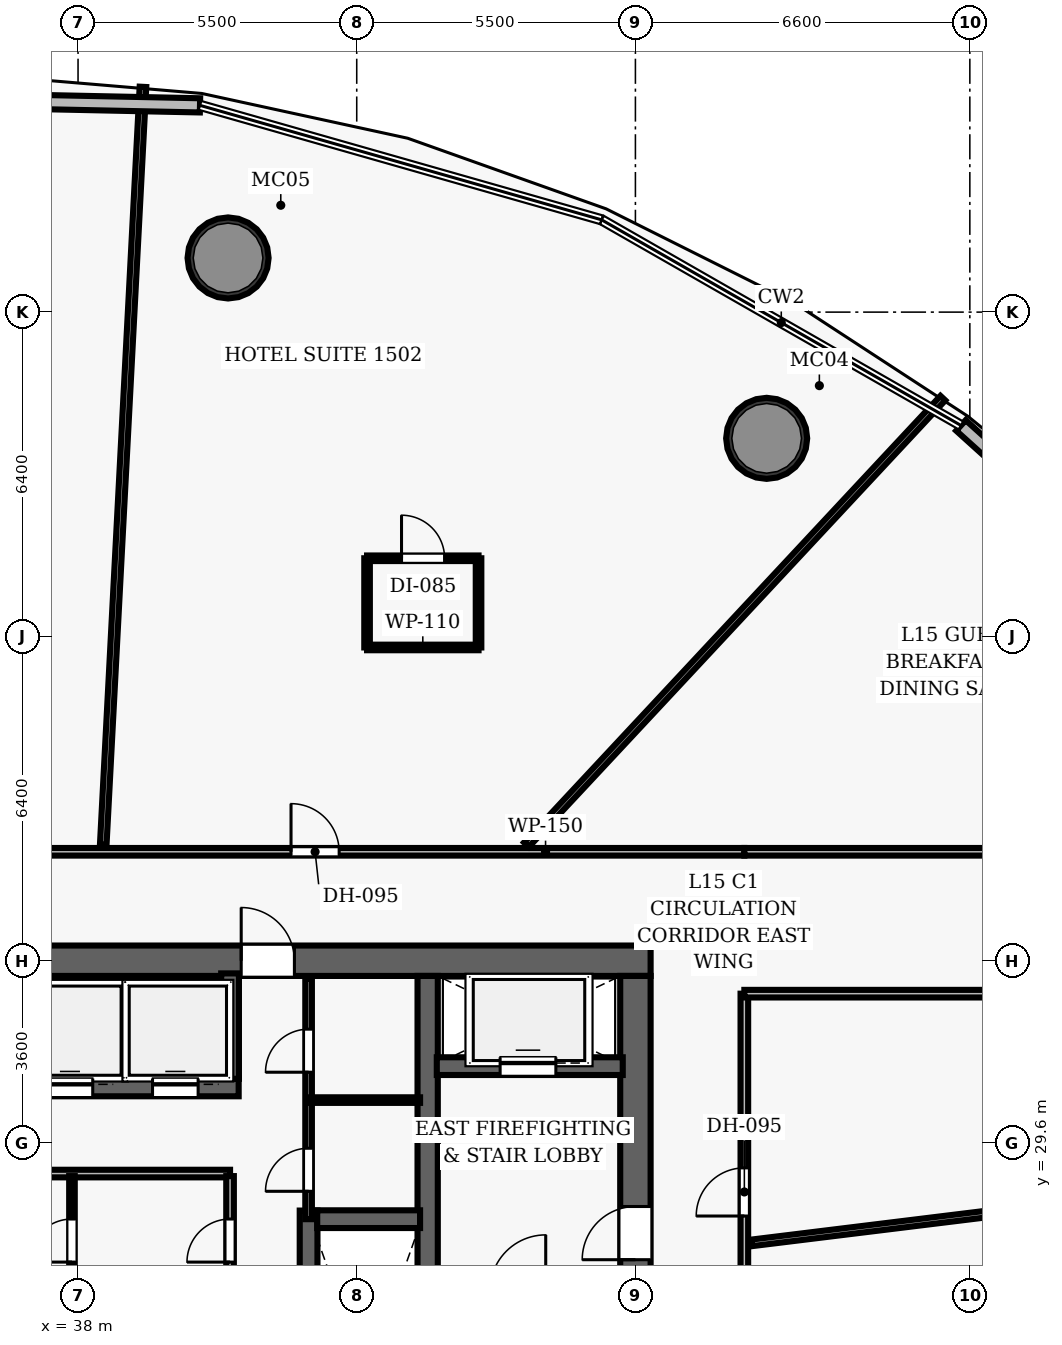
"""IFC4 building model, lengths in metres.
Left out: names, types, materials, properties, quantities, classifications, styles, units other than length and angle.
Written with IfcOpenShell. Run it as: python <this file> out.ifc"""

import sys

from ifc_helpers import new_model, si_unit, direction, frame, frame_2d, origin, origin_2d, place, context, subcontext, project, spatial, rectangle, hollow_circle, extrude, element, fill, save


model = new_model("IFC4")
c1 = context("Model", 3, precision=1e-05, world=origin(), true_north=direction((0.0, 1.0)))
c2 = subcontext(c1, "Body", "Model", "MODEL_VIEW")
j1 = project(units=[si_unit("LENGTHUNIT", "METRE"), si_unit("PLANEANGLEUNIT", "RADIAN")], contexts=[c1])
p1 = place(None, origin())
s1 = spatial("IfcSite", under=j1, at=p1, CompositionType="ELEMENT")
p2 = place(p1, origin())
s2 = spatial("IfcBuilding", under=s1, at=p2, CompositionType="ELEMENT")
p3 = place(p2, frame((0.0, 0.0, 69.4)))
s3 = spatial("IfcBuildingStorey", under=s2, at=p3, CompositionType="ELEMENT", Elevation=69.4)
p4 = place(p3, frame((26.7, 33.2, 0.0), z_axis=(0.0, 0.0, 1.0), x_axis=(1.0, 0.0, 0.0)))
e1 = element("IfcWall", 1, at=p4, inside=s3, PredefinedType="SHEAR", context=c2, shape_type="SweptSolid", body=[
    extrude(rectangle(XDim=22.6, YDim=0.6, at=frame_2d((11.3, 0.0))), origin(), (0.0, 0.0, 1.0), 3.5),
])
p5 = place(p4, frame((4.62, 0.0, 0.0)))
e2 = element("IfcOpeningElement", 2, at=p5, cuts=e1, PredefinedType="OPENING", context=c2, shape_type="SweptSolid", body=[
    extrude(rectangle(XDim=1.05, YDim=2.15, at=frame_2d((0.525, 1.075))), frame((0.0, 0.31, 0.0), z_axis=(0.0, -1.0, 0.0), x_axis=(1.0, 0.0, 0.0)), (0.0, 0.0, 1.0), 0.62),
])
p6 = place(p4, frame((14.52, 0.0, 0.0)))
e3 = element("IfcOpeningElement", 3, at=p6, cuts=e1, PredefinedType="OPENING", context=c2, shape_type="SweptSolid", body=[
    extrude(rectangle(XDim=1.05, YDim=2.15, at=frame_2d((0.525, 1.075))), frame((0.0, 0.31, 0.0), z_axis=(0.0, -1.0, 0.0), x_axis=(1.0, 0.0, 0.0)), (0.0, 0.0, 1.0), 0.62),
])
p7 = place(p3, frame((49.0, 19.1, 0.0), z_axis=(0.0, 0.0, 1.0), x_axis=(0.0, 1.0, 0.0)))
e4 = element("IfcWall", 4, at=p7, inside=s3, PredefinedType="SHEAR", context=c2, shape_type="SweptSolid", body=[
    extrude(rectangle(XDim=13.8, YDim=0.6, at=frame_2d((6.9, 0.0))), origin(), (0.0, 0.0, 1.0), 3.5),
])
p8 = place(p7, frame((8.2, 0.0, 0.0)))
e5 = element("IfcOpeningElement", 5, at=p8, cuts=e4, PredefinedType="OPENING", context=c2, shape_type="SweptSolid", body=[
    extrude(rectangle(XDim=1.05, YDim=2.15, at=frame_2d((0.525, 1.075))), frame((0.0, 0.31, 0.0), z_axis=(0.0, -1.0, 0.0), x_axis=(1.0, 0.0, 0.0)), (0.0, 0.0, 1.0), 0.62),
])
p9 = place(p3, frame((44.9, 19.1, 0.0), z_axis=(0.0, 0.0, 1.0), x_axis=(0.0, 1.0, 0.0)))
e6 = element("IfcWall", 6, at=p9, inside=s3, PredefinedType="SHEAR", context=c2, shape_type="SweptSolid", body=[
    extrude(rectangle(XDim=13.8, YDim=0.4, at=frame_2d((6.9, 0.0))), origin(), (0.0, 0.0, 1.0), 3.5),
])
for number, where, z_axis, x_axis in (
    (7, (51.59, 43.509, 0.0), (0.0, 0.0, 1.0), (1.0, 0.0, 0.0)),
    (8, (40.961, 47.069, 0.0), (0.0, 0.0, 1.0), (1.0, 0.0, 0.0)),
):
    element("IfcColumn", number, at=place(p3, frame(where, z_axis=z_axis, x_axis=x_axis)), inside=s3, PredefinedType="COLUMN", context=c2, shape_type="SweptSolid", body=[
        extrude(hollow_circle(Radius=0.8, WallThickness=0.06, at=origin_2d()), origin(), (0.0, 0.0, 1.0), 3.5),
    ])
p10 = place(p3, frame((45.08, 31.12, 0.0), z_axis=(0.0, 0.0, 1.0), x_axis=(1.0, 0.0, 0.0)))
e9 = element("IfcWall", 9, at=p10, inside=s3, PredefinedType="SHEAR", context=c2, shape_type="SweptSolid", body=[
    extrude(rectangle(XDim=3.67, YDim=0.35, at=frame_2d((1.835, 0.0))), origin(), (0.0, 0.0, 1.0), 2.6),
])
p11 = place(p10, frame((1.25, 0.0, 0.0)))
e10 = element("IfcOpeningElement", 10, at=p11, cuts=e9, PredefinedType="OPENING", context=c2, shape_type="SweptSolid", body=[
    extrude(rectangle(XDim=1.1, YDim=2.15, at=frame_2d((0.55, 1.075))), frame((0.0, 0.185, 0.0), z_axis=(0.0, -1.0, 0.0), x_axis=(1.0, 0.0, 0.0)), (0.0, 0.0, 1.0), 0.37),
])
p12 = place(p3, frame((42.55, 21.73, 0.0), z_axis=(0.0, 0.0, 1.0), x_axis=(0.0, 1.0, 0.0)))
e11 = element("IfcWall", 11, at=p12, inside=s3, PredefinedType="SHEAR", context=c2, shape_type="SweptSolid", body=[
    extrude(rectangle(XDim=6.54, YDim=0.35, at=frame_2d((3.27, 0.0))), origin(), (0.0, 0.0, 1.0), 2.6),
])
p13 = place(p3, frame((42.72, 28.1, 0.0), z_axis=(0.0, 0.0, 1.0), x_axis=(1.0, 0.0, 0.0)))
e12 = element("IfcWall", 12, at=p13, inside=s3, PredefinedType="SHEAR", context=c2, shape_type="SweptSolid", body=[
    extrude(rectangle(XDim=2.03, YDim=0.35, at=frame_2d((1.015, 0.0))), origin(), (0.0, 0.0, 1.0), 2.6),
])
p14 = place(p3, frame((34.81, 30.7, 0.0), z_axis=(0.0, 0.0, 1.0), x_axis=(1.0, 0.0, 0.0)))
e13 = element("IfcWall", 13, at=p14, inside=s3, PredefinedType="SHEAR", context=c2, shape_type="SweptSolid", body=[
    extrude(rectangle(XDim=6.36, YDim=0.35, at=frame_2d((3.18, 0.0))), origin(), (0.0, 0.0, 1.0), 2.6),
])
p15 = place(p14, frame((0.5, 0.0, 0.0)))
e14 = element("IfcOpeningElement", 14, at=p15, cuts=e13, PredefinedType="OPENING", context=c2, shape_type="SweptSolid", body=[
    extrude(rectangle(XDim=0.9, YDim=2.15, at=frame_2d((0.45, 1.075))), frame((0.0, 0.185, 0.0), z_axis=(0.0, -1.0, 0.0), x_axis=(1.0, 0.0, 0.0)), (0.0, 0.0, 1.0), 0.37),
])
p16 = place(p14, frame((2.58, 0.0, 0.0)))
e15 = element("IfcOpeningElement", 15, at=p16, cuts=e13, PredefinedType="OPENING", context=c2, shape_type="SweptSolid", body=[
    extrude(rectangle(XDim=0.9, YDim=2.15, at=frame_2d((0.45, 1.075))), frame((0.0, 0.185, 0.0), z_axis=(0.0, -1.0, 0.0), x_axis=(1.0, 0.0, 0.0)), (0.0, 0.0, 1.0), 0.37),
])
p17 = place(p14, frame((4.66, 0.0, 0.0)))
e16 = element("IfcOpeningElement", 16, at=p17, cuts=e13, PredefinedType="OPENING", context=c2, shape_type="SweptSolid", body=[
    extrude(rectangle(XDim=0.9, YDim=2.15, at=frame_2d((0.45, 1.075))), frame((0.0, 0.185, 0.0), z_axis=(0.0, -1.0, 0.0), x_axis=(1.0, 0.0, 0.0)), (0.0, 0.0, 1.0), 0.37),
])
p18 = place(p3, frame((41.0, 30.87, 0.0), z_axis=(0.0, 0.0, 1.0), x_axis=(0.0, 1.0, 0.0)))
e17 = element("IfcWall", 17, at=p18, inside=s3, PredefinedType="SHEAR", context=c2, shape_type="SweptSolid", body=[
    extrude(rectangle(XDim=2.08, YDim=0.35, at=frame_2d((1.04, 0.0))), origin(), (0.0, 0.0, 1.0), 2.6),
])
p19 = place(p3, frame((34.75, 29.0, 0.0), z_axis=(0.0, 0.0, 1.0), x_axis=(1.0, 0.0, 0.0)))
e18 = element("IfcWall", 18, at=p19, inside=s3, PredefinedType="PARTITIONING", context=c2, shape_type="SweptSolid", body=[
    extrude(rectangle(XDim=6.25, YDim=0.15, at=frame_2d((3.125, 0.0))), origin(), (0.0, 0.0, 1.0), 2.6),
])
p20 = place(p3, frame((41.0, 23.05, 0.0), z_axis=(0.0, 0.0, 1.0), x_axis=(0.0, 1.0, 0.0)))
e19 = element("IfcWall", 19, at=p20, inside=s3, PredefinedType="PARTITIONING", context=c2, shape_type="SweptSolid", body=[
    extrude(rectangle(XDim=5.9, YDim=0.15, at=frame_2d((2.95, 0.0))), origin(), (0.0, 0.0, 1.0), 2.6),
])
p21 = place(p20, frame((0.25, 0.0, 0.0)))
e20 = element("IfcOpeningElement", 20, at=p21, cuts=e19, PredefinedType="OPENING", context=c2, shape_type="SweptSolid", body=[
    extrude(rectangle(XDim=0.85, YDim=2.1, at=frame_2d((0.425, 1.05))), frame((0.0, 0.085, 0.0), z_axis=(0.0, -1.0, 0.0), x_axis=(1.0, 0.0, 0.0)), (0.0, 0.0, 1.0), 0.17),
])
p22 = place(p20, frame((2.256, 0.0, 0.0)))
e21 = element("IfcOpeningElement", 21, at=p22, cuts=e19, PredefinedType="OPENING", context=c2, shape_type="SweptSolid", body=[
    extrude(rectangle(XDim=0.85, YDim=2.1, at=frame_2d((0.425, 1.05))), frame((0.0, 0.085, 0.0), z_axis=(0.0, -1.0, 0.0), x_axis=(1.0, 0.0, 0.0)), (0.0, 0.0, 1.0), 0.17),
])
p23 = place(p20, frame((4.203, 0.0, 0.0)))
e22 = element("IfcOpeningElement", 22, at=p23, cuts=e19, PredefinedType="OPENING", context=c2, shape_type="SweptSolid", body=[
    extrude(rectangle(XDim=0.85, YDim=2.1, at=frame_2d((0.425, 1.05))), frame((0.0, 0.085, 0.0), z_axis=(0.0, -1.0, 0.0), x_axis=(1.0, 0.0, 0.0)), (0.0, 0.0, 1.0), 0.17),
])
p24 = place(p3, frame((37.88, 23.05, 0.0), z_axis=(0.0, 0.0, 1.0), x_axis=(0.0, 1.0, 0.0)))
e23 = element("IfcWall", 23, at=p24, inside=s3, PredefinedType="PARTITIONING", context=c2, shape_type="SweptSolid", body=[
    extrude(rectangle(XDim=5.9, YDim=0.11, at=frame_2d((2.95, 0.0))), origin(), (0.0, 0.0, 1.0), 2.6),
])
p25 = place(p24, frame((0.25, 0.0, 0.0)))
e24 = element("IfcOpeningElement", 24, at=p25, cuts=e23, PredefinedType="OPENING", context=c2, shape_type="SweptSolid", body=[
    extrude(rectangle(XDim=0.85, YDim=2.1, at=frame_2d((0.425, 1.05))), frame((0.0, 0.065, 0.0), z_axis=(0.0, -1.0, 0.0), x_axis=(1.0, 0.0, 0.0)), (0.0, 0.0, 1.0), 0.13),
])
p26 = place(p24, frame((2.256, 0.0, 0.0)))
e25 = element("IfcOpeningElement", 25, at=p26, cuts=e23, PredefinedType="OPENING", context=c2, shape_type="SweptSolid", body=[
    extrude(rectangle(XDim=0.85, YDim=2.1, at=frame_2d((0.425, 1.05))), frame((0.0, 0.065, 0.0), z_axis=(0.0, -1.0, 0.0), x_axis=(1.0, 0.0, 0.0)), (0.0, 0.0, 1.0), 0.13),
])
p27 = place(p24, frame((4.203, 0.0, 0.0)))
e26 = element("IfcOpeningElement", 26, at=p27, cuts=e23, PredefinedType="OPENING", context=c2, shape_type="SweptSolid", body=[
    extrude(rectangle(XDim=0.85, YDim=2.1, at=frame_2d((0.425, 1.05))), frame((0.0, 0.065, 0.0), z_axis=(0.0, -1.0, 0.0), x_axis=(1.0, 0.0, 0.0)), (0.0, 0.0, 1.0), 0.13),
])
p28 = place(p3, frame((42.55, 28.1, 0.0), z_axis=(0.0, 0.0, 1.0), x_axis=(0.0, 1.0, 0.0)))
e27 = element("IfcWall", 27, at=p28, inside=s3, PredefinedType="PARTITIONING", context=c2, shape_type="SweptSolid", body=[
    extrude(rectangle(XDim=4.75, YDim=0.13, at=frame_2d((2.375, 0.0))), origin(), (0.0, 0.0, 1.0), 2.6),
])
p29 = place(p28, frame((0.55, 0.0, 0.0)))
e28 = element("IfcOpeningElement", 28, at=p29, cuts=e27, PredefinedType="OPENING", context=c2, shape_type="SweptSolid", body=[
    extrude(rectangle(XDim=0.85, YDim=2.1, at=frame_2d((0.425, 1.05))), frame((0.0, 0.075, 0.0), z_axis=(0.0, -1.0, 0.0), x_axis=(1.0, 0.0, 0.0)), (0.0, 0.0, 1.0), 0.15),
])
p30 = place(p28, frame((2.9, 0.0, 0.0)))
e29 = element("IfcOpeningElement", 29, at=p30, cuts=e27, PredefinedType="OPENING", context=c2, shape_type="SweptSolid", body=[
    extrude(rectangle(XDim=0.85, YDim=2.1, at=frame_2d((0.425, 1.05))), frame((0.0, 0.075, 0.0), z_axis=(0.0, -1.0, 0.0), x_axis=(1.0, 0.0, 0.0)), (0.0, 0.0, 1.0), 0.15),
])
p31 = place(p3, frame((42.55, 30.45, 0.0), z_axis=(0.0, 0.0, 1.0), x_axis=(1.0, 0.0, 0.0)))
e30 = element("IfcWall", 30, at=p31, inside=s3, PredefinedType="PARTITIONING", context=c2, shape_type="SweptSolid", body=[
    extrude(rectangle(XDim=2.2, YDim=0.11, at=frame_2d((1.1, 0.0))), origin(), (0.0, 0.0, 1.0), 2.6),
])
p32 = place(p3, frame((27.65, 35.35, 0.0), z_axis=(0.0, 0.0, 1.0), x_axis=(1.0, 0.0, 0.0)))
e31 = element("IfcWall", 31, at=p32, inside=s3, PredefinedType="PARTITIONING", context=c2, shape_type="SweptSolid", body=[
    extrude(rectangle(XDim=23.5, YDim=0.15, at=frame_2d((11.75, 0.0))), origin(), (0.0, 0.0, 1.0), 2.6),
])
p33 = place(p32, frame((14.553, 0.0, 0.0)))
e32 = element("IfcOpeningElement", 32, at=p33, cuts=e31, PredefinedType="OPENING", context=c2, shape_type="SweptSolid", body=[
    extrude(rectangle(XDim=0.95, YDim=2.15, at=frame_2d((0.475, 1.075))), frame((0.0, 0.085, 0.0), z_axis=(0.0, -1.0, 0.0), x_axis=(1.0, 0.0, 0.0)), (0.0, 0.0, 1.0), 0.17),
])
p34 = place(p32, frame((7.784, 0.0, 0.0)))
e33 = element("IfcOpeningElement", 33, at=p34, cuts=e31, PredefinedType="OPENING", context=c2, shape_type="SweptSolid", body=[
    extrude(rectangle(XDim=0.95, YDim=2.15, at=frame_2d((0.475, 1.075))), frame((0.0, 0.085, 0.0), z_axis=(0.0, -1.0, 0.0), x_axis=(1.0, 0.0, 0.0)), (0.0, 0.0, 1.0), 0.17),
])
p35 = place(p3, frame((51.15, 16.65, 0.0), z_axis=(0.0, 0.0, 1.0), x_axis=(0.0, 1.0, 0.0)))
e34 = element("IfcWall", 34, at=p35, inside=s3, PredefinedType="PARTITIONING", context=c2, shape_type="SweptSolid", body=[
    extrude(rectangle(XDim=15.9, YDim=0.15, at=frame_2d((7.95, 0.0))), origin(), (0.0, 0.0, 1.0), 2.6),
])
p36 = place(p35, frame((11.512, 0.0, 0.0)))
e35 = element("IfcOpeningElement", 35, at=p36, cuts=e34, PredefinedType="OPENING", context=c2, shape_type="SweptSolid", body=[
    extrude(rectangle(XDim=0.95, YDim=2.15, at=frame_2d((0.475, 1.075))), frame((0.0, 0.085, 0.0), z_axis=(0.0, -1.0, 0.0), x_axis=(1.0, 0.0, 0.0)), (0.0, 0.0, 1.0), 0.17),
])
p37 = place(p35, frame((7.004, 0.0, 0.0)))
e36 = element("IfcOpeningElement", 36, at=p37, cuts=e34, PredefinedType="OPENING", context=c2, shape_type="SweptSolid", body=[
    extrude(rectangle(XDim=0.95, YDim=2.15, at=frame_2d((0.475, 1.075))), frame((0.0, 0.085, 0.0), z_axis=(0.0, -1.0, 0.0), x_axis=(1.0, 0.0, 0.0)), (0.0, 0.0, 1.0), 0.17),
])
for number, where, z_axis, x_axis in (
    (37, (51.15, 35.35, 0.0), (0.0, 0.0, 1.0), (1.0, 0.0, 0.0)),
    (38, (51.15, 32.55, 0.0), (0.0, 0.0, 1.0), (1.0, 0.0, 0.0)),
):
    element("IfcWall", number, at=place(p3, frame(where, z_axis=z_axis, x_axis=x_axis)), inside=s3, PredefinedType="PARTITIONING", context=c2, shape_type="SweptSolid", body=[
        extrude(rectangle(XDim=11.759, YDim=0.15, at=frame_2d((5.88, 0.0))), origin(), (0.0, 0.0, 1.0), 2.6),
    ])
p38 = place(p3, frame((51.29, 27.632, 0.0), z_axis=(0.0, 0.0, 1.0), x_axis=(0.992547009995, 0.121862352469, 0.0)))
e39 = element("IfcWall", 39, at=p38, inside=s3, PredefinedType="PARTITIONING", context=c2, shape_type="SweptSolid", body=[
    extrude(rectangle(XDim=16.033, YDim=0.13, at=frame_2d((8.017, 0.0))), origin(), (0.0, 0.0, 1.0), 2.6),
])
p39 = place(p3, frame((46.85, 35.49, 0.0), z_axis=(0.0, 0.0, 1.0), x_axis=(0.681999123192, 0.731352989988, 0.0)))
e40 = element("IfcWall", 40, at=p39, inside=s3, PredefinedType="PARTITIONING", context=c2, shape_type="SweptSolid", body=[
    extrude(rectangle(XDim=12.05, YDim=0.13, at=frame_2d((6.025, 0.0))), origin(), (0.0, 0.0, 1.0), 2.6),
])
p40 = place(p3, frame((38.497, 35.49, 0.0), z_axis=(0.0, 0.0, 1.0), x_axis=(0.052328670598, 0.998629916552, 0.0)))
e41 = element("IfcWall", 41, at=p40, inside=s3, PredefinedType="PARTITIONING", context=c2, shape_type="SweptSolid", body=[
    extrude(rectangle(XDim=14.976, YDim=0.13, at=frame_2d((7.488, 0.0))), origin(), (0.0, 0.0, 1.0), 2.6),
])
p41 = place(p3, frame((43.704, 39.382, 0.0), z_axis=(0.0, 0.0, 1.0), x_axis=(1.0, 0.0, 0.0)))
e42 = element("IfcWall", 42, at=p41, inside=s3, PredefinedType="PARTITIONING", context=c2, shape_type="SweptSolid", body=[
    extrude(rectangle(XDim=2.2, YDim=0.11, at=frame_2d((1.1, 0.0))), origin(), (0.0, 0.0, 1.0), 2.6),
])
p42 = place(p3, frame((43.704, 41.142, 0.0), z_axis=(0.0, 0.0, 1.0), x_axis=(1.0, 0.0, 0.0)))
e43 = element("IfcWall", 43, at=p42, inside=s3, PredefinedType="PARTITIONING", context=c2, shape_type="SweptSolid", body=[
    extrude(rectangle(XDim=2.2, YDim=0.11, at=frame_2d((1.1, 0.0))), origin(), (0.0, 0.0, 1.0), 2.6),
])
p43 = place(p42, frame((0.68, 0.0, 0.0)))
e44 = element("IfcOpeningElement", 44, at=p43, cuts=e43, PredefinedType="OPENING", context=c2, shape_type="SweptSolid", body=[
    extrude(rectangle(XDim=0.85, YDim=2.1, at=frame_2d((0.425, 1.05))), frame((0.0, 0.065, 0.0), z_axis=(0.0, -1.0, 0.0), x_axis=(1.0, 0.0, 0.0)), (0.0, 0.0, 1.0), 0.13),
])
for number, where, z_axis, x_axis in (
    (45, (43.704, 39.382, 0.0), (0.0, 0.0, 1.0), (0.0, 1.0, 0.0)),
    (46, (45.904, 39.382, 0.0), (0.0, 0.0, 1.0), (0.0, 1.0, 0.0)),
):
    element("IfcWall", number, at=place(p3, frame(where, z_axis=z_axis, x_axis=x_axis)), inside=s3, PredefinedType="PARTITIONING", context=c2, shape_type="SweptSolid", body=[
        extrude(rectangle(XDim=1.76, YDim=0.11, at=frame_2d((0.88, 0.0))), origin(), (0.0, 0.0, 1.0), 2.6),
    ])
p44 = place(p3, frame((55.425, 43.764, 0.0), z_axis=(0.0, 0.0, 1.0), x_axis=(0.742358761102, -0.670002589409, 0.0)))
e47 = element("IfcWall", 47, at=p44, inside=s3, PredefinedType="SOLIDWALL", context=c2, shape_type="SweptSolid", body=[
    extrude(rectangle(XDim=7.845, YDim=0.28, at=frame_2d((3.922, 0.0))), origin(), (0.0, 0.0, 1.0), 3.25),
])
p45 = place(p3, frame((32.167, 50.252, 0.0), z_axis=(0.0, 0.0, 1.0), x_axis=(0.999783120984, -0.020825729179, 0.0)))
e48 = element("IfcWall", 48, at=p45, inside=s3, PredefinedType="SOLIDWALL", context=c2, shape_type="SweptSolid", body=[
    extrude(rectangle(XDim=8.241, YDim=0.28, at=frame_2d((4.121, 0.0))), origin(), (0.0, 0.0, 1.0), 3.25),
])
p46 = place(p8, origin())
e49 = element("IfcDoor", 49, at=p46, inside=s3, OperationType="SINGLE_SWING_LEFT", PredefinedType="DOOR", context=c2, shape_type="SweptSolid", body=[
    extrude(rectangle(XDim=1.05, YDim=2.15, at=frame_2d((0.525, 1.075))), frame((0.0, 0.025, 0.0), z_axis=(0.0, -1.0, 0.0), x_axis=(1.0, 0.0, 0.0)), (0.0, 0.0, 1.0), 0.05),
])
fill(e5, e49)
p47 = place(p6, origin())
e50 = element("IfcDoor", 50, at=p47, inside=s3, OperationType="SINGLE_SWING_LEFT", PredefinedType="DOOR", context=c2, shape_type="SweptSolid", body=[
    extrude(rectangle(XDim=1.05, YDim=2.15, at=frame_2d((0.525, 1.075))), frame((0.0, 0.025, 0.0), z_axis=(0.0, -1.0, 0.0), x_axis=(1.0, 0.0, 0.0)), (0.0, 0.0, 1.0), 0.05),
])
fill(e3, e50)
p48 = place(p23, origin())
e51 = element("IfcDoor", 51, at=p48, inside=s3, OperationType="SINGLE_SWING_LEFT", PredefinedType="DOOR", context=c2, shape_type="SweptSolid", body=[
    extrude(rectangle(XDim=0.85, YDim=2.1, at=frame_2d((0.425, 1.05))), frame((0.0, 0.025, 0.0), z_axis=(0.0, -1.0, 0.0), x_axis=(1.0, 0.0, 0.0)), (0.0, 0.0, 1.0), 0.05),
])
fill(e22, e51)
p49 = place(p27, origin())
e52 = element("IfcDoor", 52, at=p49, inside=s3, OperationType="SINGLE_SWING_LEFT", PredefinedType="DOOR", context=c2, shape_type="SweptSolid", body=[
    extrude(rectangle(XDim=0.85, YDim=2.1, at=frame_2d((0.425, 1.05))), frame((0.0, 0.025, 0.0), z_axis=(0.0, -1.0, 0.0), x_axis=(1.0, 0.0, 0.0)), (0.0, 0.0, 1.0), 0.05),
])
fill(e26, e52)
p50 = place(p29, origin())
e53 = element("IfcDoor", 53, at=p50, inside=s3, OperationType="SINGLE_SWING_LEFT", PredefinedType="DOOR", context=c2, shape_type="SweptSolid", body=[
    extrude(rectangle(XDim=0.85, YDim=2.1, at=frame_2d((0.425, 1.05))), frame((0.0, 0.025, 0.0), z_axis=(0.0, -1.0, 0.0), x_axis=(1.0, 0.0, 0.0)), (0.0, 0.0, 1.0), 0.05),
])
fill(e28, e53)
p51 = place(p30, origin())
e54 = element("IfcDoor", 54, at=p51, inside=s3, OperationType="SINGLE_SWING_LEFT", PredefinedType="DOOR", context=c2, shape_type="SweptSolid", body=[
    extrude(rectangle(XDim=0.85, YDim=2.1, at=frame_2d((0.425, 1.05))), frame((0.0, 0.025, 0.0), z_axis=(0.0, -1.0, 0.0), x_axis=(1.0, 0.0, 0.0)), (0.0, 0.0, 1.0), 0.05),
])
fill(e29, e54)
p52 = place(p36, origin())
e55 = element("IfcDoor", 55, at=p52, inside=s3, OperationType="SINGLE_SWING_LEFT", PredefinedType="DOOR", context=c2, shape_type="SweptSolid", body=[
    extrude(rectangle(XDim=0.95, YDim=2.15, at=frame_2d((0.475, 1.075))), frame((0.0, 0.025, 0.0), z_axis=(0.0, -1.0, 0.0), x_axis=(1.0, 0.0, 0.0)), (0.0, 0.0, 1.0), 0.05),
])
fill(e35, e55)
p53 = place(p33, origin())
e56 = element("IfcDoor", 56, at=p53, inside=s3, OperationType="SINGLE_SWING_LEFT", PredefinedType="DOOR", context=c2, shape_type="SweptSolid", body=[
    extrude(rectangle(XDim=0.95, YDim=2.15, at=frame_2d((0.475, 1.075))), frame((0.0, 0.025, 0.0), z_axis=(0.0, -1.0, 0.0), x_axis=(1.0, 0.0, 0.0)), (0.0, 0.0, 1.0), 0.05),
])
fill(e32, e56)
p54 = place(p43, origin())
e57 = element("IfcDoor", 57, at=p54, inside=s3, OperationType="SINGLE_SWING_LEFT", PredefinedType="DOOR", context=c2, shape_type="SweptSolid", body=[
    extrude(rectangle(XDim=0.85, YDim=2.1, at=frame_2d((0.425, 1.05))), frame((0.0, 0.025, 0.0), z_axis=(0.0, -1.0, 0.0), x_axis=(1.0, 0.0, 0.0)), (0.0, 0.0, 1.0), 0.05),
])
fill(e44, e57)
p55 = place(p16, origin())
e58 = element("IfcDoor", 58, at=p55, inside=s3, OperationType="SLIDING_TO_LEFT", PredefinedType="DOOR", context=c2, shape_type="SweptSolid", body=[
    extrude(rectangle(XDim=0.9, YDim=2.15, at=frame_2d((0.45, 1.075))), frame((0.0, 0.025, 0.0), z_axis=(0.0, -1.0, 0.0), x_axis=(1.0, 0.0, 0.0)), (0.0, 0.0, 1.0), 0.05),
])
fill(e15, e58)
p56 = place(p17, origin())
e59 = element("IfcDoor", 59, at=p56, inside=s3, OperationType="SLIDING_TO_LEFT", PredefinedType="DOOR", context=c2, shape_type="SweptSolid", body=[
    extrude(rectangle(XDim=0.9, YDim=2.15, at=frame_2d((0.45, 1.075))), frame((0.0, 0.025, 0.0), z_axis=(0.0, -1.0, 0.0), x_axis=(1.0, 0.0, 0.0)), (0.0, 0.0, 1.0), 0.05),
])
fill(e16, e59)
p57 = place(p11, origin())
e60 = element("IfcDoor", 60, at=p57, inside=s3, OperationType="SLIDING_TO_LEFT", PredefinedType="DOOR", context=c2, shape_type="SweptSolid", body=[
    extrude(rectangle(XDim=1.1, YDim=2.15, at=frame_2d((0.55, 1.075))), frame((0.0, 0.025, 0.0), z_axis=(0.0, -1.0, 0.0), x_axis=(1.0, 0.0, 0.0)), (0.0, 0.0, 1.0), 0.05),
])
fill(e10, e60)
save(model, sys.argv[1])
